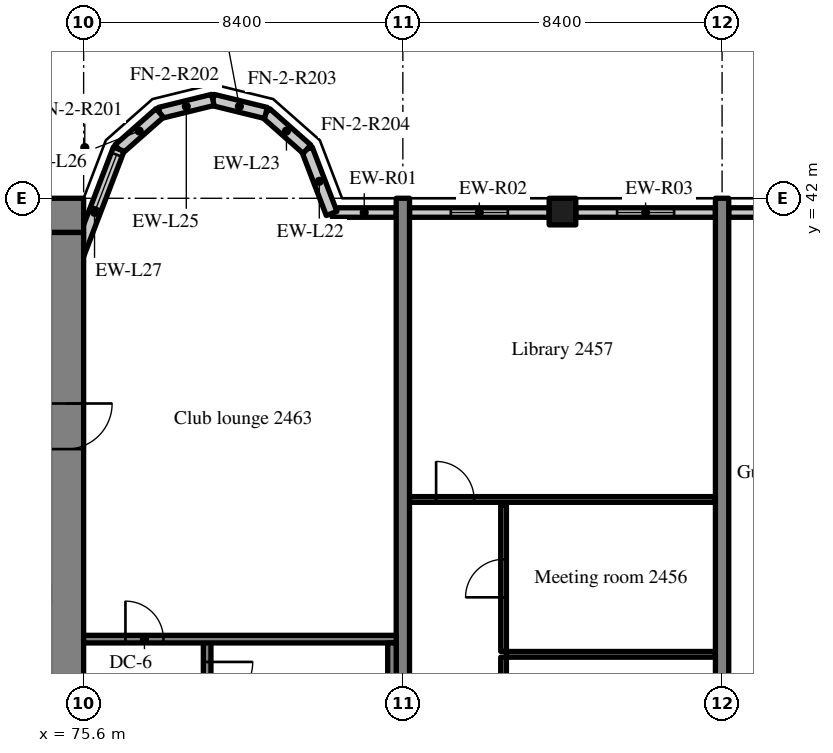
"""IFC4 building model, lengths in metres.
Left out: names, types, materials, properties, quantities, classifications, styles, units other than length and angle.
Written with IfcOpenShell. Run it as: python <this file> out.ifc"""

import sys

from ifc_helpers import new_model, si_unit, direction, frame, frame_2d, origin, origin_2d, place, context, subcontext, project, spatial, rectangle, extrude, source, transform, mapped, element, fill, save


model = new_model("IFC4")
c1 = context("Model", 3, precision=1e-05, world=origin(), true_north=direction((0.0, 1.0)))
c2 = subcontext(c1, "Body", "Model", "MODEL_VIEW")
j1 = project(units=[si_unit("LENGTHUNIT", "METRE"), si_unit("PLANEANGLEUNIT", "RADIAN")], contexts=[c1])
p1 = place(None, origin())
s1 = spatial("IfcSite", under=j1, at=p1, CompositionType="ELEMENT")
p2 = place(p1, origin())
s2 = spatial("IfcBuilding", under=s1, at=p2, CompositionType="ELEMENT")
p3 = place(p2, frame((0.0, 0.0, 102.8)))
s3 = spatial("IfcBuildingStorey", under=s2, at=p3, CompositionType="ELEMENT", Elevation=102.8)
m1 = source(origin(), c2, "Body", "SweptSolid", [
    extrude(rectangle(XDim=50.4, YDim=0.9, at=frame_2d((25.2, 0.0))), origin(), (0.0, 0.0, 1.0), 3.52),
])
p4 = place(p3, frame((25.2, 41.55, 0.0), z_axis=(0.0, 0.0, 1.0), x_axis=(1.0, 0.0, 0.0)))
e1 = element("IfcWall", 1, at=p4, inside=s3, PredefinedType="SHEAR", context=c2, shape_type="MappedRepresentation", body=[
    mapped(m1, transform((0.0, 0.0, 0.0), scale=1.0)),
])
m2 = source(origin(), c2, "Body", "SweptSolid", [
    extrude(rectangle(XDim=18.2, YDim=0.9, at=frame_2d((9.1, 0.0))), origin(), (0.0, 0.0, 1.0), 3.52),
])
p5 = place(p3, frame((75.15, 22.9, 0.0), z_axis=(0.0, 0.0, 1.0), x_axis=(0.0, 1.0, 0.0)))
e2 = element("IfcWall", 2, at=p5, inside=s3, PredefinedType="SHEAR", context=c2, shape_type="MappedRepresentation", body=[
    mapped(m2, transform((0.0, 0.0, 0.0), scale=1.0)),
])
m3 = source(origin(), c2, "Body", "SweptSolid", [
    extrude(rectangle(XDim=1.2, YDim=2.1, at=frame_2d((0.6, 1.05))), frame((0.0, 0.46, 0.0), z_axis=(0.0, -1.0, 0.0), x_axis=(1.0, 0.0, 0.0)), (0.0, 0.0, 1.0), 0.92),
])
p6 = place(p5, frame((12.5, 0.0, 0.0)))
e3 = element("IfcOpeningElement", 3, at=p6, cuts=e2, PredefinedType="OPENING", context=c2, shape_type="MappedRepresentation", body=[
    mapped(m3, transform((0.0, 0.0, 0.0), scale=1.0)),
])
m4 = source(origin(), c2, "Body", "SweptSolid", [
    extrude(rectangle(XDim=20.0, YDim=0.35, at=frame_2d((10.0, 0.0))), origin(), (0.0, 0.0, 1.0), 3.52),
])
for number, where, z_axis, x_axis in (
    (4, (84.0, 22.0, 0.0), (0.0, 0.0, 1.0), (0.0, 1.0, 0.0)),
    (5, (92.4, 22.0, 0.0), (0.0, 0.0, 1.0), (0.0, 1.0, 0.0)),
):
    element("IfcWall", number, at=place(p3, frame(where, z_axis=z_axis, x_axis=x_axis)), inside=s3, PredefinedType="SHEAR", context=c2, shape_type="MappedRepresentation", body=[
        mapped(m4, transform((0.0, 0.0, 0.0), scale=1.0)),
    ])
m5 = source(origin(), c2, "Body", "SweptSolid", [
    extrude(rectangle(XDim=0.7, YDim=0.7, at=origin_2d()), origin(), (0.0, 0.0, 1.0), 3.52),
])
p7 = place(p3, frame((88.2, 41.65, 0.0), z_axis=(0.0, 0.0, 1.0), x_axis=(1.0, 0.0, 0.0)))
e6 = element("IfcColumn", 6, at=p7, inside=s3, PredefinedType="COLUMN", context=c2, shape_type="MappedRepresentation", body=[
    mapped(m5, transform((0.0, 0.0, 0.0), scale=1.0)),
])
m6 = source(origin(), c2, "Body", "SweptSolid", [
    extrude(rectangle(XDim=1.683, YDim=0.25, at=frame_2d((0.841, 0.0))), origin(), (0.0, 0.0, 1.0), 2.82),
])
p8 = place(p3, frame((83.825, 41.625, 0.0), z_axis=(0.0, 0.0, 1.0), x_axis=(-1.0, 0.0, 0.0)))
e7 = element("IfcWall", 7, at=p8, inside=s3, PredefinedType="SOLIDWALL", context=c2, shape_type="MappedRepresentation", body=[
    mapped(m6, transform((0.0, 0.0, 0.0), scale=1.0)),
])
m7 = source(origin(), c2, "Body", "SweptSolid", [
    extrude(rectangle(XDim=3.675, YDim=0.25, at=frame_2d((1.837, 0.0))), origin(), (0.0, 0.0, 1.0), 2.82),
])
p9 = place(p3, frame((87.85, 41.625, 0.0), z_axis=(0.0, 0.0, 1.0), x_axis=(-1.0, 0.0, 0.0)))
e8 = element("IfcWall", 8, at=p9, inside=s3, PredefinedType="SOLIDWALL", context=c2, shape_type="MappedRepresentation", body=[
    mapped(m7, transform((0.0, 0.0, 0.0), scale=1.0)),
])
m8 = source(origin(), c2, "Body", "SweptSolid", [
    extrude(rectangle(XDim=1.5, YDim=1.5, at=frame_2d((0.75, 0.75))), frame((0.0, 0.135, 0.0), z_axis=(0.0, -1.0, 0.0), x_axis=(1.0, 0.0, 0.0)), (0.0, 0.0, 1.0), 0.27),
])
p10 = place(p9, frame((1.087, 0.0, 0.9)))
e9 = element("IfcOpeningElement", 9, at=p10, cuts=e8, PredefinedType="OPENING", context=c2, shape_type="MappedRepresentation", body=[
    mapped(m8, transform((0.0, 0.0, 0.0), scale=1.0)),
])
p11 = place(p3, frame((92.225, 41.625, 0.0), z_axis=(0.0, 0.0, 1.0), x_axis=(-1.0, 0.0, 0.0)))
e10 = element("IfcWall", 10, at=p11, inside=s3, PredefinedType="SOLIDWALL", context=c2, shape_type="MappedRepresentation", body=[
    mapped(m7, transform((0.0, 0.0, 0.0), scale=1.0)),
])
p12 = place(p11, frame((1.087, 0.0, 0.9)))
e11 = element("IfcOpeningElement", 11, at=p12, cuts=e10, PredefinedType="OPENING", context=c2, shape_type="MappedRepresentation", body=[
    mapped(m8, transform((0.0, 0.0, 0.0), scale=1.0)),
])
m9 = source(origin(), c2, "Body", "SweptSolid", [
    extrude(rectangle(XDim=4.07, YDim=0.25, at=frame_2d((2.035, 0.0))), origin(), (0.0, 0.0, 1.0), 2.82),
])
p13 = place(p3, frame((96.645, 41.625, 0.0), z_axis=(0.0, 0.0, 1.0), x_axis=(-1.0, 0.0, 0.0)))
e12 = element("IfcWall", 12, at=p13, inside=s3, PredefinedType="SOLIDWALL", context=c2, shape_type="MappedRepresentation", body=[
    mapped(m9, transform((0.0, 0.0, 0.0), scale=1.0)),
])
p14 = place(p13, frame((1.285, 0.0, 0.9)))
e13 = element("IfcOpeningElement", 13, at=p14, cuts=e12, PredefinedType="OPENING", context=c2, shape_type="MappedRepresentation", body=[
    mapped(m8, transform((0.0, 0.0, 0.0), scale=1.0)),
])
m10 = source(origin(), c2, "Body", "SweptSolid", [
    extrude(rectangle(XDim=1.812, YDim=0.3, at=frame_2d((0.906, 0.0))), origin(), (0.0, 0.0, 1.0), 3.52),
])
p15 = place(p3, frame((82.125, 41.6, 0.0), z_axis=(0.0, 0.0, 1.0), x_axis=(-0.357877270961, 0.93376863244, 0.0)))
e14 = element("IfcWall", 14, at=p15, inside=s3, PredefinedType="SOLIDWALL", context=c2, shape_type="MappedRepresentation", body=[
    mapped(m10, transform((0.0, 0.0, 0.0), scale=1.0)),
])
m11 = source(origin(), c2, "Body", "SweptSolid", [
    extrude(rectangle(XDim=1.44, YDim=0.3, at=frame_2d((0.72, 0.0))), origin(), (0.0, 0.0, 1.0), 3.52),
])
p16 = place(p3, frame((81.477, 43.292, 0.0), z_axis=(0.0, 0.0, 1.0), x_axis=(-0.74957555648, 0.661918790432, 0.0)))
e15 = element("IfcWall", 15, at=p16, inside=s3, PredefinedType="SOLIDWALL", context=c2, shape_type="MappedRepresentation", body=[
    mapped(m11, transform((0.0, 0.0, 0.0), scale=1.0)),
])
m12 = source(origin(), c2, "Body", "SweptSolid", [
    extrude(rectangle(XDim=1.439, YDim=0.3, at=frame_2d((0.719, 0.0))), origin(), (0.0, 0.0, 1.0), 3.52),
])
for number, where, z_axis, x_axis in (
    (16, (80.397, 44.245, 0.0), (0.0, 0.0, 1.0), (-0.971, 0.238, 0.0)),
    (17, (79.0, 44.588, 0.0), (0.0, 0.0, 1.0), (-0.971, -0.238, 0.0)),
):
    element("IfcWall", number, at=place(p3, frame(where, z_axis=z_axis, x_axis=x_axis)), inside=s3, PredefinedType="SOLIDWALL", context=c2, shape_type="MappedRepresentation", body=[
        mapped(m12, transform((0.0, 0.0, 0.0), scale=1.0)),
    ])
p17 = place(p3, frame((77.603, 44.245, 0.0), z_axis=(0.0, 0.0, 1.0), x_axis=(-0.74957555648, -0.661918790432, 0.0)))
e18 = element("IfcWall", 18, at=p17, inside=s3, PredefinedType="SOLIDWALL", context=c2, shape_type="MappedRepresentation", body=[
    mapped(m11, transform((0.0, 0.0, 0.0), scale=1.0)),
])
m13 = source(origin(), c2, "Body", "SweptSolid", [
    extrude(rectangle(XDim=3.559, YDim=0.3, at=frame_2d((1.78, 0.0))), origin(), (0.0, 0.0, 1.0), 3.52),
])
p18 = place(p3, frame((76.523, 43.292, 0.0), z_axis=(0.0, 0.0, 1.0), x_axis=(-0.35779745313, -0.933799219604, 0.0)))
e19 = element("IfcWall", 19, at=p18, inside=s3, PredefinedType="SOLIDWALL", context=c2, shape_type="MappedRepresentation", body=[
    mapped(m13, transform((0.0, 0.0, 0.0), scale=1.0)),
])
m14 = source(origin(), c2, "Body", "SweptSolid", [
    extrude(rectangle(XDim=1.5, YDim=2.0, at=frame_2d((0.75, 1.0))), frame((0.0, 0.16, 0.0), z_axis=(0.0, -1.0, 0.0), x_axis=(1.0, 0.0, 0.0)), (0.0, 0.0, 1.0), 0.32),
])
p19 = place(p18, frame((0.156, 0.0, 0.9)))
e20 = element("IfcOpeningElement", 20, at=p19, cuts=e19, PredefinedType="OPENING", context=c2, shape_type="MappedRepresentation", body=[
    mapped(m14, transform((0.0, 0.0, 0.0), scale=1.0)),
])
m15 = source(origin(), c2, "Body", "SweptSolid", [
    extrude(rectangle(XDim=8.3, YDim=0.2, at=frame_2d((4.15, 0.0))), origin(), (0.0, 0.0, 1.0), 3.52),
])
p20 = place(p3, frame((78.85, 22.1, 0.0), z_axis=(0.0, 0.0, 1.0), x_axis=(0.0, 1.0, 0.0)))
e21 = element("IfcWall", 21, at=p20, inside=s3, PredefinedType="SOLIDWALL", context=c2, shape_type="MappedRepresentation", body=[
    mapped(m15, transform((0.0, 0.0, 0.0), scale=1.0)),
])
m16 = source(origin(), c2, "Body", "SweptSolid", [
    extrude(rectangle(XDim=1.2, YDim=2.1, at=frame_2d((0.6, 1.05))), frame((0.0, 0.11, 0.0), z_axis=(0.0, -1.0, 0.0), x_axis=(1.0, 0.0, 0.0)), (0.0, 0.0, 1.0), 0.22),
])
p21 = place(p20, frame((6.5, 0.0, 0.0)))
e22 = element("IfcOpeningElement", 22, at=p21, cuts=e21, PredefinedType="OPENING", context=c2, shape_type="MappedRepresentation", body=[
    mapped(m16, transform((0.0, 0.0, 0.0), scale=1.0)),
])
m17 = source(origin(), c2, "Body", "SweptSolid", [
    extrude(rectangle(XDim=8.225, YDim=0.2, at=frame_2d((4.112, 0.0))), origin(), (0.0, 0.0, 1.0), 3.52),
])
p22 = place(p3, frame((83.825, 30.4, 0.0), z_axis=(0.0, 0.0, 1.0), x_axis=(-1.0, 0.0, 0.0)))
e23 = element("IfcWall", 23, at=p22, inside=s3, PredefinedType="SOLIDWALL", context=c2, shape_type="MappedRepresentation", body=[
    mapped(m17, transform((0.0, 0.0, 0.0), scale=1.0)),
])
m18 = source(origin(), c2, "Body", "SweptSolid", [
    extrude(rectangle(XDim=1.0, YDim=2.1, at=frame_2d((0.5, 1.05))), frame((0.0, 0.11, 0.0), z_axis=(0.0, -1.0, 0.0), x_axis=(1.0, 0.0, 0.0)), (0.0, 0.0, 1.0), 0.22),
])
p23 = place(p22, frame((6.125, 0.0, 0.0)))
e24 = element("IfcOpeningElement", 24, at=p23, cuts=e23, PredefinedType="OPENING", context=c2, shape_type="MappedRepresentation", body=[
    mapped(m18, transform((0.0, 0.0, 0.0), scale=1.0)),
])
m19 = source(origin(), c2, "Body", "SweptSolid", [
    extrude(rectangle(XDim=8.1, YDim=0.225, at=frame_2d((4.05, 0.0))), origin(), (0.0, 0.0, 1.0), 3.52),
])
p24 = place(p3, frame((83.713, 22.2, 0.0), z_axis=(0.0, 0.0, 1.0), x_axis=(0.0, 1.0, 0.0)))
e25 = element("IfcWall", 25, at=p24, inside=s3, PredefinedType="SOLIDWALL", context=c2, shape_type="MappedRepresentation", body=[
    mapped(m19, transform((0.0, 0.0, 0.0), scale=1.0)),
])
m20 = source(origin(), c2, "Body", "SweptSolid", [
    extrude(rectangle(XDim=3.25, YDim=0.15, at=frame_2d((1.625, 0.0))), origin(), (0.0, 0.0, 1.0), 3.52),
])
p25 = place(p3, frame((86.65, 26.675, 0.0), z_axis=(0.0, 0.0, 1.0), x_axis=(0.0, 1.0, 0.0)))
e26 = element("IfcWall", 26, at=p25, inside=s3, PredefinedType="PARTITIONING", context=c2, shape_type="MappedRepresentation", body=[
    mapped(m20, transform((0.0, 0.0, 0.0), scale=1.0)),
])
m21 = source(origin(), c2, "Body", "SweptSolid", [
    extrude(rectangle(XDim=1.0, YDim=2.1, at=frame_2d((0.5, 1.05))), frame((0.0, 0.085, 0.0), z_axis=(0.0, -1.0, 0.0), x_axis=(1.0, 0.0, 0.0)), (0.0, 0.0, 1.0), 0.17),
])
p26 = place(p25, frame((1.125, 0.0, 0.0)))
e27 = element("IfcOpeningElement", 27, at=p26, cuts=e26, PredefinedType="OPENING", context=c2, shape_type="MappedRepresentation", body=[
    mapped(m21, transform((0.0, 0.0, 0.0), scale=1.0)),
])
m22 = source(origin(), c2, "Body", "SweptSolid", [
    extrude(rectangle(XDim=5.5, YDim=0.15, at=frame_2d((2.75, 0.0))), origin(), (0.0, 0.0, 1.0), 3.52),
])
p27 = place(p3, frame((86.725, 30.0, 0.0), z_axis=(0.0, 0.0, 1.0), x_axis=(1.0, 0.0, 0.0)))
e28 = element("IfcWall", 28, at=p27, inside=s3, PredefinedType="PARTITIONING", context=c2, shape_type="MappedRepresentation", body=[
    mapped(m22, transform((0.0, 0.0, 0.0), scale=1.0)),
])
m23 = source(origin(), c2, "Body", "SweptSolid", [
    extrude(rectangle(XDim=3.85, YDim=0.15, at=frame_2d((1.925, 0.0))), origin(), (0.0, 0.0, 1.0), 3.52),
])
p28 = place(p3, frame((86.65, 30.075, 0.0), z_axis=(0.0, 0.0, 1.0), x_axis=(0.0, 1.0, 0.0)))
e29 = element("IfcWall", 29, at=p28, inside=s3, PredefinedType="PARTITIONING", context=c2, shape_type="MappedRepresentation", body=[
    mapped(m23, transform((0.0, 0.0, 0.0), scale=1.0)),
])
p29 = place(p28, frame((1.425, 0.0, 0.0)))
e30 = element("IfcOpeningElement", 30, at=p29, cuts=e29, PredefinedType="OPENING", context=c2, shape_type="MappedRepresentation", body=[
    mapped(m21, transform((0.0, 0.0, 0.0), scale=1.0)),
])
m24 = source(origin(), c2, "Body", "SweptSolid", [
    extrude(rectangle(XDim=8.05, YDim=0.15, at=frame_2d((4.025, 0.0))), origin(), (0.0, 0.0, 1.0), 3.52),
])
p30 = place(p3, frame((84.175, 34.075, 0.0), z_axis=(0.0, 0.0, 1.0), x_axis=(1.0, 0.0, 0.0)))
e31 = element("IfcWall", 31, at=p30, inside=s3, PredefinedType="PARTITIONING", context=c2, shape_type="MappedRepresentation", body=[
    mapped(m24, transform((0.0, 0.0, 0.0), scale=1.0)),
])
p31 = place(p30, frame((0.7, 0.0, 0.0)))
e32 = element("IfcOpeningElement", 32, at=p31, cuts=e31, PredefinedType="OPENING", context=c2, shape_type="MappedRepresentation", body=[
    mapped(m21, transform((0.0, 0.0, 0.0), scale=1.0)),
])
m25 = source(origin(), c2, "Body", "SweptSolid", [
    extrude(rectangle(XDim=1.5, YDim=1.5, at=frame_2d((0.75, 0.75))), frame((0.0, 0.03, 0.0), z_axis=(0.0, -1.0, 0.0), x_axis=(1.0, 0.0, 0.0)), (0.0, 0.0, 1.0), 0.06),
])
p32 = place(p10, origin())
e33 = element("IfcWindow", 33, at=p32, inside=s3, PartitioningType="SINGLE_PANEL", PredefinedType="WINDOW", context=c2, shape_type="MappedRepresentation", body=[
    mapped(m25, transform((0.0, 0.0, 0.0), scale=1.0)),
])
fill(e9, e33)
p33 = place(p12, origin())
e34 = element("IfcWindow", 34, at=p33, inside=s3, PartitioningType="SINGLE_PANEL", PredefinedType="WINDOW", context=c2, shape_type="MappedRepresentation", body=[
    mapped(m25, transform((0.0, 0.0, 0.0), scale=1.0)),
])
fill(e11, e34)
m26 = source(origin(), c2, "Body", "SweptSolid", [
    extrude(rectangle(XDim=1.5, YDim=2.0, at=frame_2d((0.75, 1.0))), frame((0.0, 0.03, 0.0), z_axis=(0.0, -1.0, 0.0), x_axis=(1.0, 0.0, 0.0)), (0.0, 0.0, 1.0), 0.06),
])
p34 = place(p19, origin())
e35 = element("IfcWindow", 35, at=p34, inside=s3, PartitioningType="SINGLE_PANEL", PredefinedType="WINDOW", context=c2, shape_type="MappedRepresentation", body=[
    mapped(m26, transform((0.0, 0.0, 0.0), scale=1.0)),
])
fill(e20, e35)
m27 = source(origin(), c2, "Body", "SweptSolid", [
    extrude(rectangle(XDim=1.2, YDim=2.1, at=frame_2d((0.6, 1.05))), frame((0.0, 0.025, 0.0), z_axis=(0.0, -1.0, 0.0), x_axis=(1.0, 0.0, 0.0)), (0.0, 0.0, 1.0), 0.05),
])
p35 = place(p6, origin())
e36 = element("IfcDoor", 36, at=p35, inside=s3, OperationType="SINGLE_SWING_RIGHT", PredefinedType="DOOR", context=c2, shape_type="MappedRepresentation", body=[
    mapped(m27, transform((0.0, 0.0, 0.0), scale=1.0)),
])
fill(e3, e36)
p36 = place(p21, origin())
e37 = element("IfcDoor", 37, at=p36, inside=s3, OperationType="SINGLE_SWING_RIGHT", PredefinedType="DOOR", context=c2, shape_type="MappedRepresentation", body=[
    mapped(m27, transform((0.0, 0.0, 0.0), scale=1.0)),
])
fill(e22, e37)
m28 = source(origin(), c2, "Body", "SweptSolid", [
    extrude(rectangle(XDim=1.0, YDim=2.1, at=frame_2d((0.5, 1.05))), frame((0.0, 0.025, 0.0), z_axis=(0.0, -1.0, 0.0), x_axis=(1.0, 0.0, 0.0)), (0.0, 0.0, 1.0), 0.05),
])
p37 = place(p23, origin())
e38 = element("IfcDoor", 38, at=p37, inside=s3, OperationType="SINGLE_SWING_RIGHT", PredefinedType="DOOR", context=c2, shape_type="MappedRepresentation", body=[
    mapped(m28, transform((0.0, 0.0, 0.0), scale=1.0)),
])
fill(e24, e38)
p38 = place(p29, origin())
e39 = element("IfcDoor", 39, at=p38, inside=s3, OperationType="SINGLE_SWING_LEFT", PredefinedType="DOOR", context=c2, shape_type="MappedRepresentation", body=[
    mapped(m28, transform((0.0, 0.0, 0.0), scale=1.0)),
])
fill(e30, e39)
p39 = place(p31, origin())
e40 = element("IfcDoor", 40, at=p39, inside=s3, OperationType="SINGLE_SWING_LEFT", PredefinedType="DOOR", context=c2, shape_type="MappedRepresentation", body=[
    mapped(m28, transform((0.0, 0.0, 0.0), scale=1.0)),
])
fill(e32, e40)
save(model, sys.argv[1])
